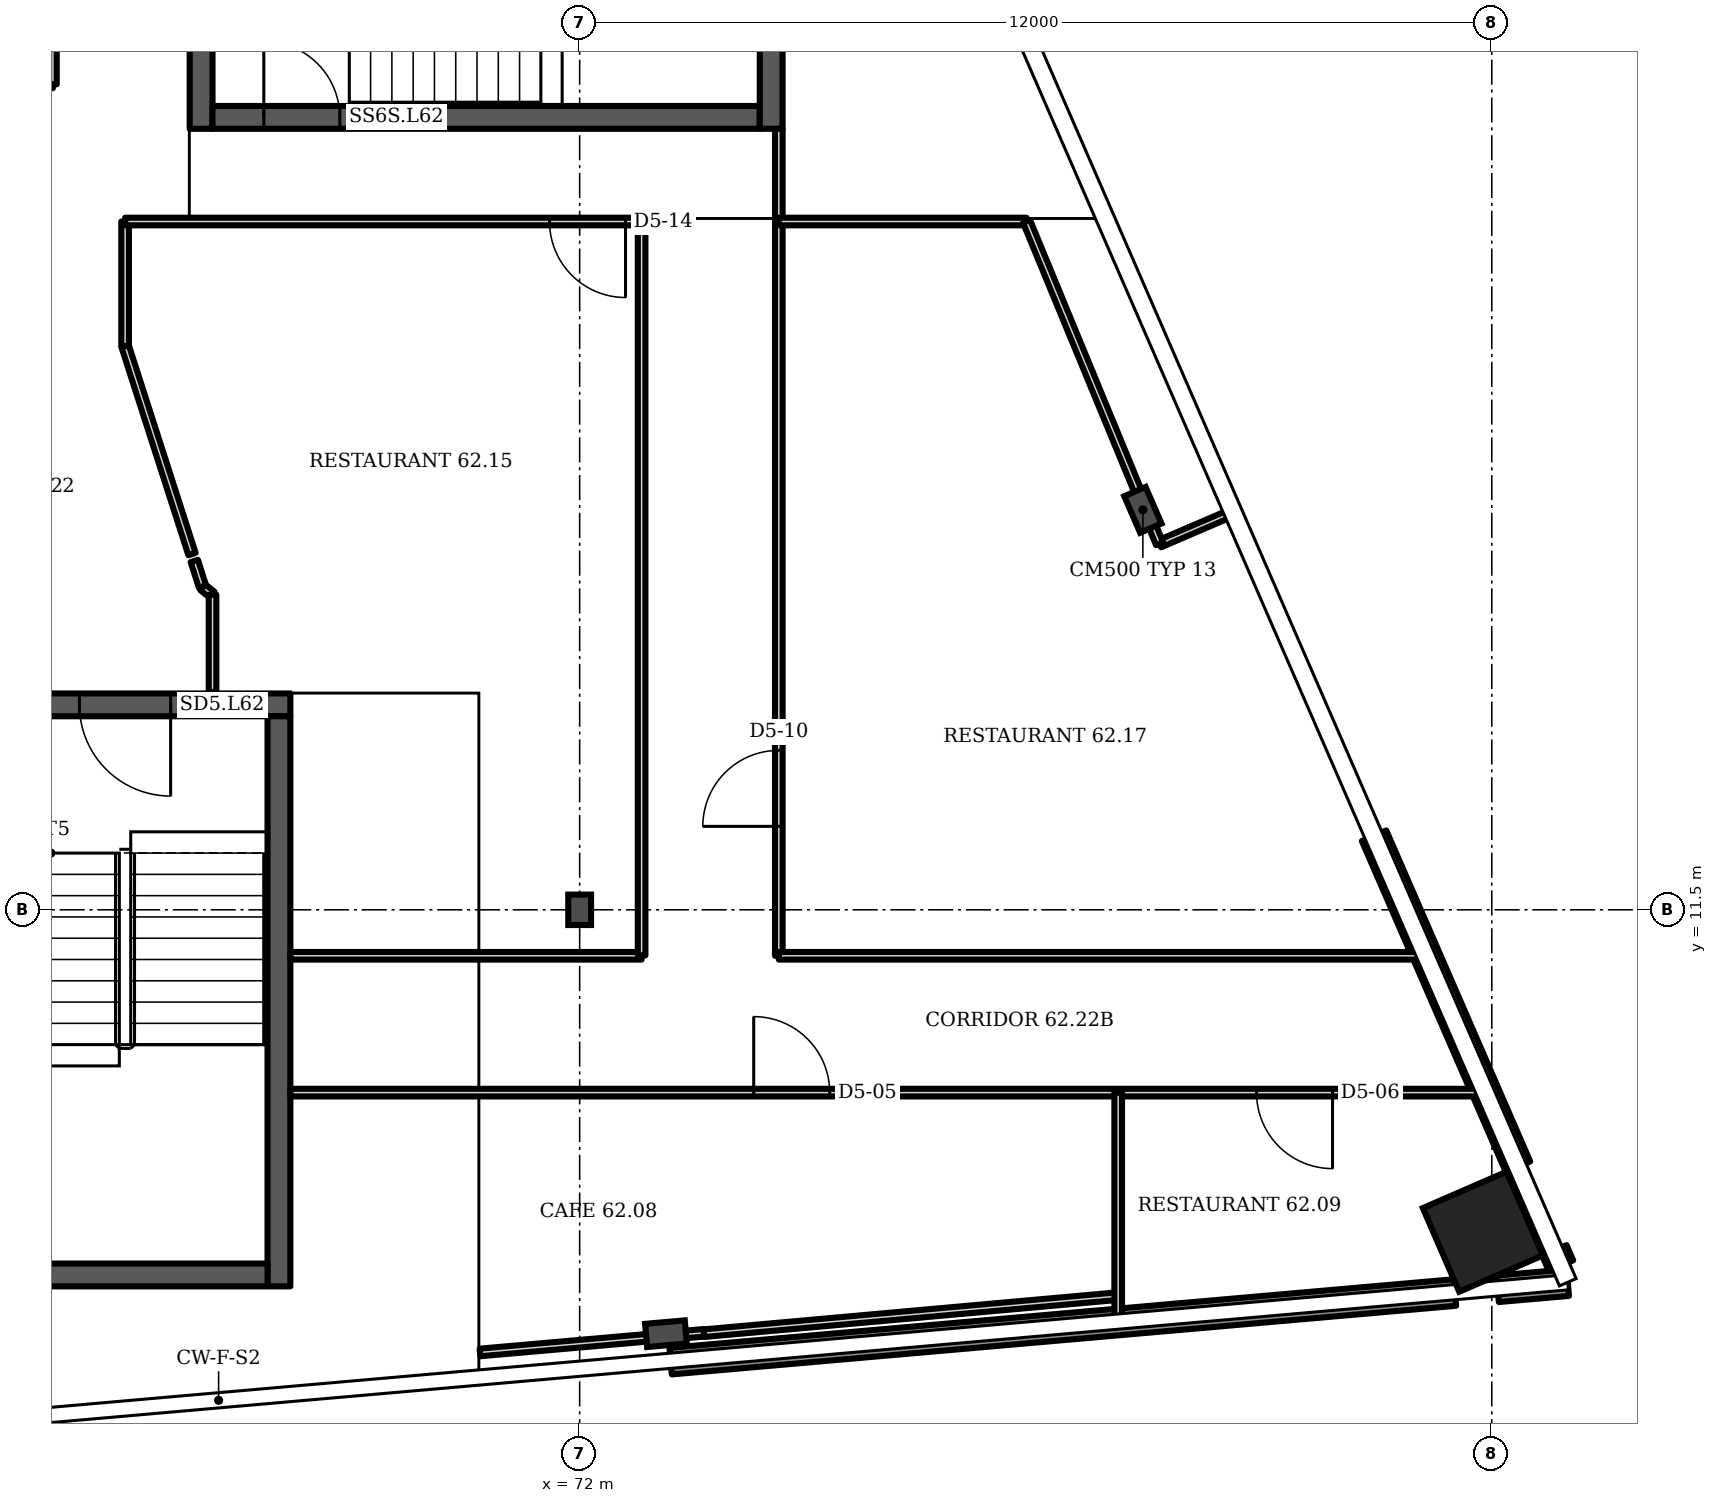
"""IFC4 building model, lengths in metres.
Left out: names, types, materials, properties, quantities, classifications, styles, units other than length and angle.
Written with IfcOpenShell. Run it as: python <this file> out.ifc"""

import sys

from ifc_helpers import new_model, si_unit, direction, frame, frame_2d, origin, origin_2d, place, context, subcontext, project, spatial, rectangle, i_section, extrude, element, fill, save


model = new_model("IFC4")
c1 = context("Model", 3, precision=1e-05, world=origin(), true_north=direction((0.0, 1.0)))
c2 = subcontext(c1, "Body", "Model", "MODEL_VIEW")
j1 = project(units=[si_unit("LENGTHUNIT", "METRE"), si_unit("PLANEANGLEUNIT", "RADIAN")], contexts=[c1])
p1 = place(None, origin())
s1 = spatial("IfcSite", under=j1, at=p1, CompositionType="ELEMENT")
p2 = place(p1, origin())
s2 = spatial("IfcBuilding", under=s1, at=p2, CompositionType="ELEMENT")
p3 = place(p2, frame((0.0, 0.0, 246.7)))
s3 = spatial("IfcBuildingStorey", under=s2, at=p3, CompositionType="ELEMENT", Elevation=246.7)
p4 = place(p3, frame((83.883, 7.265, 0.0), z_axis=(0.0, 0.0, 1.0), x_axis=(-0.398727, 0.917072, 0.0)))
e1 = element("IfcColumn", 1, at=p4, inside=s3, PredefinedType="COLUMN", context=c2, shape_type="SweptSolid", body=[
    extrude(rectangle(XDim=1.2, YDim=1.2, at=origin_2d()), origin(), (0.0, 0.0, 1.0), 3.6),
])
for number, where, z_axis, x_axis in (
    (2, (73.135, 5.923, 0.0), (0.0, 0.0, 1.0), (0.087, -0.996, 0.0)),
    (3, (79.41, 16.762, 0.0), (0.0, 0.0, 1.0), (0.917, 0.399, 0.0)),
):
    element("IfcColumn", number, at=place(p3, frame(where, z_axis=z_axis, x_axis=x_axis)), inside=s3, PredefinedType="COLUMN", context=c2, shape_type="SweptSolid", body=[
        extrude(i_section(OverallWidth=0.306, OverallDepth=0.524, WebThickness=0.021, FlangeThickness=0.04, FilletRadius=0.027, at=origin_2d()), origin(), (0.0, 0.0, 1.0), 3.6),
    ])
p5 = place(p3, frame((72.0, 11.5, 0.0), z_axis=(0.0, 0.0, 1.0), x_axis=(1.0, 0.0, 0.0)))
e4 = element("IfcColumn", 4, at=p5, inside=s3, PredefinedType="COLUMN", context=c2, shape_type="SweptSolid", body=[
    extrude(i_section(OverallWidth=0.3, OverallDepth=0.4, WebThickness=0.013, FlangeThickness=0.024, FilletRadius=0.027, at=origin_2d()), origin(), (0.0, 0.0, 1.0), 3.6),
])
p6 = place(p3, frame((73.197, 5.562, 0.0), z_axis=(0.0, 0.0, 1.0), x_axis=(0.996198, 0.087163, 0.0)))
e5 = element("IfcWall", 5, at=p6, inside=s3, PredefinedType="SOLIDWALL", context=c2, shape_type="SweptSolid", body=[
    extrude(rectangle(XDim=10.358, YDim=0.35, at=frame_2d((5.179, 0.0))), origin(), (0.0, 0.0, 1.0), 1.0),
])
p7 = place(p3, frame((84.078, 6.514, 0.0), z_axis=(0.0, 0.0, 1.0), x_axis=(0.996213, 0.086971, 0.0)))
e6 = element("IfcWall", 6, at=p7, inside=s3, PredefinedType="SOLIDWALL", context=c2, shape_type="SweptSolid", body=[
    extrude(rectangle(XDim=0.926, YDim=0.35, at=frame_2d((0.463, 0.0))), origin(), (0.0, 0.0, 1.0), 1.0),
])
p8 = place(p3, frame((84.91, 6.819, 0.0), z_axis=(0.0, 0.0, 1.0), x_axis=(-0.398359, 0.91723, 0.0)))
e7 = element("IfcWall", 7, at=p8, inside=s3, PredefinedType="SOLIDWALL", context=c2, shape_type="SweptSolid", body=[
    extrude(rectangle(XDim=0.219, YDim=0.35, at=frame_2d((0.109, 0.0))), origin(), (0.0, 0.0, 1.0), 1.0),
])
p9 = place(p3, frame((84.345, 8.12, 0.0), z_axis=(0.0, 0.0, 1.0), x_axis=(-0.398736, 0.917067, 0.0)))
e8 = element("IfcWall", 8, at=p9, inside=s3, PredefinedType="SOLIDWALL", context=c2, shape_type="SweptSolid", body=[
    extrude(rectangle(XDim=4.748, YDim=0.35, at=frame_2d((2.374, 0.0))), origin(), (0.0, 0.0, 1.0), 1.0),
])
p10 = place(p3, frame((63.844, 14.196, 0.0), z_axis=(0.0, 0.0, 1.0), x_axis=(1.0, 0.0, 0.0)))
e9 = element("IfcWall", 9, at=p10, inside=s3, PredefinedType="SHEAR", context=c2, shape_type="SweptSolid", body=[
    extrude(rectangle(XDim=4.35, YDim=0.3, at=frame_2d((2.175, 0.0))), origin(), (0.0, 0.0, 1.0), 3.2),
])
p11 = place(p10, frame((1.575, 0.0, 0.0)))
e10 = element("IfcOpeningElement", 10, at=p11, cuts=e9, PredefinedType="OPENING", context=c2, shape_type="SweptSolid", body=[
    extrude(rectangle(XDim=1.2, YDim=2.1, at=frame_2d((0.6, 1.05))), frame((0.0, 0.16, 0.0), z_axis=(0.0, -1.0, 0.0), x_axis=(1.0, 0.0, 0.0)), (0.0, 0.0, 1.0), 0.32),
])
p12 = place(p3, frame((67.02, 21.775, 0.0), z_axis=(0.0, 0.0, 1.0), x_axis=(0.0, 1.0, 0.0)))
e11 = element("IfcWall", 11, at=p12, inside=s3, PredefinedType="SHEAR", context=c2, shape_type="SweptSolid", body=[
    extrude(rectangle(XDim=4.35, YDim=0.3, at=frame_2d((2.175, 0.0))), origin(), (0.0, 0.0, 1.0), 3.2),
])
p13 = place(p12, frame((1.575, 0.0, 0.0)))
e12 = element("IfcOpeningElement", 12, at=p13, cuts=e11, PredefinedType="OPENING", context=c2, shape_type="SweptSolid", body=[
    extrude(rectangle(XDim=1.2, YDim=2.1, at=frame_2d((0.6, 1.05))), frame((0.0, 0.16, 0.0), z_axis=(0.0, -1.0, 0.0), x_axis=(1.0, 0.0, 0.0)), (0.0, 0.0, 1.0), 0.32),
])
p14 = place(p3, frame((67.17, 21.925, 0.0), z_axis=(0.0, 0.0, 1.0), x_axis=(1.0, 0.0, 0.0)))
e13 = element("IfcWall", 13, at=p14, inside=s3, PredefinedType="SHEAR", context=c2, shape_type="SweptSolid", body=[
    extrude(rectangle(XDim=7.2, YDim=0.3, at=frame_2d((3.6, 0.0))), origin(), (0.0, 0.0, 1.0), 3.2),
])
p15 = place(p14, frame((0.675, 0.0, 0.0)))
e14 = element("IfcOpeningElement", 14, at=p15, cuts=e13, PredefinedType="OPENING", context=c2, shape_type="SweptSolid", body=[
    extrude(rectangle(XDim=1.0, YDim=2.1, at=frame_2d((0.5, 1.05))), frame((0.0, 0.16, 0.0), z_axis=(0.0, -1.0, 0.0), x_axis=(1.0, 0.0, 0.0)), (0.0, 0.0, 1.0), 0.32),
])
p16 = place(p3, frame((65.07, 22.36, 0.0), z_axis=(0.0, 0.0, 1.0), x_axis=(0.0, 1.0, 0.0)))
e15 = element("IfcWall", 15, at=p16, inside=s3, PredefinedType="PARTITIONING", context=c2, shape_type="SweptSolid", body=[
    extrude(rectangle(XDim=3.495, YDim=0.1, at=frame_2d((1.748, 0.0))), origin(), (0.0, 0.0, 1.0), 3.2),
])
p17 = place(p3, frame((66.02, 18.915, 0.0), z_axis=(0.0, 0.0, 1.0), x_axis=(0.0, 1.0, 0.0)))
e16 = element("IfcWall", 16, at=p17, inside=s3, PredefinedType="PARTITIONING", context=c2, shape_type="SweptSolid", body=[
    extrude(rectangle(XDim=1.64, YDim=0.1, at=frame_2d((0.82, 0.0))), origin(), (0.0, 0.0, 1.0), 3.2),
])
p18 = place(p3, frame((66.02, 20.555, 0.0), z_axis=(0.0, 0.0, 1.0), x_axis=(1.0, 0.0, 0.0)))
e17 = element("IfcWall", 17, at=p18, inside=s3, PredefinedType="PARTITIONING", context=c2, shape_type="SweptSolid", body=[
    extrude(rectangle(XDim=6.795, YDim=0.1, at=frame_2d((3.397, 0.0))), origin(), (0.0, 0.0, 1.0), 3.2),
])
p19 = place(p18, frame((5.583, 0.0, 0.0)))
e18 = element("IfcOpeningElement", 18, at=p19, cuts=e17, PredefinedType="OPENING", context=c2, shape_type="SweptSolid", body=[
    extrude(rectangle(XDim=1.0, YDim=2.1, at=frame_2d((0.5, 1.05))), frame((0.0, 0.06, 0.0), z_axis=(0.0, -1.0, 0.0), x_axis=(1.0, 0.0, 0.0)), (0.0, 0.0, 1.0), 0.12),
])
p20 = place(p3, frame((66.9, 16.18, 0.0), z_axis=(0.0, 0.0, 1.0), x_axis=(-0.306242, 0.95195, 0.0)))
e19 = element("IfcWall", 19, at=p20, inside=s3, PredefinedType="PARTITIONING", context=c2, shape_type="SweptSolid", body=[
    extrude(rectangle(XDim=2.873, YDim=0.1, at=frame_2d((1.437, 0.0))), origin(), (0.0, 0.0, 1.0), 3.2),
])
p21 = place(p3, frame((67.04, 15.745, 0.0), z_axis=(0.0, 0.0, 1.0), x_axis=(-0.304065, 0.952647, 0.0)))
e20 = element("IfcWall", 20, at=p21, inside=s3, PredefinedType="PARTITIONING", context=c2, shape_type="SweptSolid", body=[
    extrude(rectangle(XDim=0.362, YDim=0.1, at=frame_2d((0.181, 0.0))), origin(), (0.0, 0.0, 1.0), 3.2),
])
p22 = place(p3, frame((67.165, 15.645, 0.0), z_axis=(0.0, 0.0, 1.0), x_axis=(-0.780569, 0.625065, 0.0)))
e21 = element("IfcWall", 21, at=p22, inside=s3, PredefinedType="PARTITIONING", context=c2, shape_type="SweptSolid", body=[
    extrude(rectangle(XDim=0.16, YDim=0.1, at=frame_2d((0.08, 0.0))), origin(), (0.0, 0.0, 1.0), 3.2),
])
p23 = place(p3, frame((67.17, 14.366, 0.0), z_axis=(0.0, 0.0, 1.0), x_axis=(0.0, 1.0, 0.0)))
e22 = element("IfcWall", 22, at=p23, inside=s3, PredefinedType="PARTITIONING", context=c2, shape_type="SweptSolid", body=[
    extrude(rectangle(XDim=1.279, YDim=0.1, at=frame_2d((0.639, 0.0))), origin(), (0.0, 0.0, 1.0), 3.2),
])
p24 = place(p3, frame((68.194, 9.095, 0.0), z_axis=(0.0, 0.0, 1.0), x_axis=(1.0, 0.0, 0.0)))
e23 = element("IfcWall", 23, at=p24, inside=s3, PredefinedType="PARTITIONING", context=c2, shape_type="SweptSolid", body=[
    extrude(rectangle(XDim=15.699, YDim=0.1, at=frame_2d((7.85, 0.0))), origin(), (0.0, 0.0, 1.0), 2.58),
])
p25 = place(p24, frame((6.096, 0.0, 0.0)))
e24 = element("IfcOpeningElement", 24, at=p25, cuts=e23, PredefinedType="OPENING", context=c2, shape_type="SweptSolid", body=[
    extrude(rectangle(XDim=1.0, YDim=2.1, at=frame_2d((0.5, 1.05))), frame((0.0, 0.06, 0.0), z_axis=(0.0, -1.0, 0.0), x_axis=(1.0, 0.0, 0.0)), (0.0, 0.0, 1.0), 0.12),
])
p26 = place(p24, frame((12.711, 0.0, 0.0)))
e25 = element("IfcOpeningElement", 25, at=p26, cuts=e23, PredefinedType="OPENING", context=c2, shape_type="SweptSolid", body=[
    extrude(rectangle(XDim=1.0, YDim=2.1, at=frame_2d((0.5, 1.05))), frame((0.0, 0.06, 0.0), z_axis=(0.0, -1.0, 0.0), x_axis=(1.0, 0.0, 0.0)), (0.0, 0.0, 1.0), 0.12),
])
p27 = place(p3, frame((68.194, 10.895, 0.0), z_axis=(0.0, 0.0, 1.0), x_axis=(1.0, 0.0, 0.0)))
e26 = element("IfcWall", 26, at=p27, inside=s3, PredefinedType="PARTITIONING", context=c2, shape_type="SweptSolid", body=[
    extrude(rectangle(XDim=4.621, YDim=0.1, at=frame_2d((2.311, 0.0))), origin(), (0.0, 0.0, 1.0), 3.2),
])
p28 = place(p3, frame((70.689, 5.677, 0.0), z_axis=(0.0, 0.0, 1.0), x_axis=(0.996174, 0.087417, 0.0)))
e27 = element("IfcWall", 27, at=p28, inside=s3, PredefinedType="PARTITIONING", context=c2, shape_type="SweptSolid", body=[
    extrude(rectangle(XDim=2.958, YDim=0.1, at=frame_2d((1.479, 0.0))), origin(), (0.0, 0.0, 1.0), 2.58),
])
p29 = place(p3, frame((72.815, 10.9, 0.0), z_axis=(0.0, 0.0, 1.0), x_axis=(0.0, 1.0, 0.0)))
e28 = element("IfcWall", 28, at=p29, inside=s3, PredefinedType="PARTITIONING", context=c2, shape_type="SweptSolid", body=[
    extrude(rectangle(XDim=9.725, YDim=0.1, at=frame_2d((4.863, 0.0))), origin(), (0.0, 0.0, 1.0), 3.2),
])
p30 = place(p3, frame((73.635, 5.93, 0.0), z_axis=(0.0, 0.0, 1.0), x_axis=(0.996013, 0.089228, 0.0)))
e29 = element("IfcWall", 29, at=p30, inside=s3, PredefinedType="PARTITIONING", context=c2, shape_type="SweptSolid", body=[
    extrude(rectangle(XDim=5.437, YDim=0.1, at=frame_2d((2.718, 0.0))), origin(), (0.0, 0.0, 1.0), 2.58),
])
p31 = place(p3, frame((74.62, 10.895, 0.0), z_axis=(0.0, 0.0, 1.0), x_axis=(0.0, 1.0, 0.0)))
e30 = element("IfcWall", 30, at=p31, inside=s3, PredefinedType="PARTITIONING", context=c2, shape_type="SweptSolid", body=[
    extrude(rectangle(XDim=10.88, YDim=0.1, at=frame_2d((5.44, 0.0))), origin(), (0.0, 0.0, 1.0), 3.2),
])
p32 = place(p31, frame((1.703, 0.0, 0.0)))
e31 = element("IfcOpeningElement", 31, at=p32, cuts=e30, PredefinedType="OPENING", context=c2, shape_type="SweptSolid", body=[
    extrude(rectangle(XDim=1.0, YDim=2.1, at=frame_2d((0.5, 1.05))), frame((0.0, 0.06, 0.0), z_axis=(0.0, -1.0, 0.0), x_axis=(1.0, 0.0, 0.0)), (0.0, 0.0, 1.0), 0.12),
])
p33 = place(p3, frame((74.62, 10.895, 0.0), z_axis=(0.0, 0.0, 1.0), x_axis=(1.0, 0.0, 0.0)))
e32 = element("IfcWall", 32, at=p33, inside=s3, PredefinedType="PARTITIONING", context=c2, shape_type="SweptSolid", body=[
    extrude(rectangle(XDim=8.491, YDim=0.1, at=frame_2d((4.245, 0.0))), origin(), (0.0, 0.0, 1.0), 2.58),
])
p34 = place(p3, frame((74.62, 20.555, 0.0), z_axis=(0.0, 0.0, 1.0), x_axis=(1.0, 0.0, 0.0)))
e33 = element("IfcWall", 33, at=p34, inside=s3, PredefinedType="PARTITIONING", context=c2, shape_type="SweptSolid", body=[
    extrude(rectangle(XDim=3.26, YDim=0.1, at=frame_2d((1.63, 0.0))), origin(), (0.0, 0.0, 1.0), 3.2),
])
p35 = place(p3, frame((79.085, 6.12, 0.0), z_axis=(0.0, 0.0, 1.0), x_axis=(0.0, 1.0, 0.0)))
e34 = element("IfcWall", 34, at=p35, inside=s3, PredefinedType="PARTITIONING", context=c2, shape_type="SweptSolid", body=[
    extrude(rectangle(XDim=2.975, YDim=0.1, at=frame_2d((1.487, 0.0))), origin(), (0.0, 0.0, 1.0), 2.58),
])
p36 = place(p3, frame((79.63, 16.315, 0.0), z_axis=(0.0, 0.0, 1.0), x_axis=(0.918616, 0.395147, 0.0)))
e35 = element("IfcWall", 35, at=p36, inside=s3, PredefinedType="PARTITIONING", context=c2, shape_type="SweptSolid", body=[
    extrude(rectangle(XDim=1.031, YDim=0.1, at=frame_2d((0.516, 0.0))), origin(), (0.0, 0.0, 1.0), 2.58),
])
p37 = place(p3, frame((79.63, 16.315, 0.0), z_axis=(0.0, 0.0, 1.0), x_axis=(-0.381517, 0.924359, 0.0)))
e36 = element("IfcWall", 36, at=p37, inside=s3, PredefinedType="PARTITIONING", context=c2, shape_type="SweptSolid", body=[
    extrude(rectangle(XDim=4.587, YDim=0.1, at=frame_2d((2.293, 0.0))), origin(), (0.0, 0.0, 1.0), 3.2),
])
p38 = place(p3, frame((68.044, 6.546, 0.0), z_axis=(0.0, 0.0, 1.0), x_axis=(0.0, 1.0, 0.0)))
e37 = element("IfcWall", 37, at=p38, inside=s3, PredefinedType="SHEAR", context=c2, shape_type="SweptSolid", body=[
    extrude(rectangle(XDim=7.5, YDim=0.3, at=frame_2d((3.75, 0.0))), origin(), (0.0, 0.0, 1.0), 3.2),
])
p39 = place(p3, frame((64.144, 6.696, 0.0), z_axis=(0.0, 0.0, 1.0), x_axis=(1.0, 0.0, 0.0)))
e38 = element("IfcWall", 38, at=p39, inside=s3, PredefinedType="SHEAR", context=c2, shape_type="SweptSolid", body=[
    extrude(rectangle(XDim=3.75, YDim=0.3, at=frame_2d((1.875, 0.0))), origin(), (0.0, 0.0, 1.0), 3.2),
])
p40 = place(p3, frame((74.52, 21.775, 0.0), z_axis=(0.0, 0.0, 1.0), x_axis=(0.0, 1.0, 0.0)))
e39 = element("IfcWall", 39, at=p40, inside=s3, PredefinedType="SHEAR", context=c2, shape_type="SweptSolid", body=[
    extrude(rectangle(XDim=4.05, YDim=0.3, at=frame_2d((2.025, 0.0))), origin(), (0.0, 0.0, 1.0), 3.2),
])
p41 = place(p11, origin())
e40 = element("IfcDoor", 40, at=p41, inside=s3, OperationType="SINGLE_SWING_RIGHT", PredefinedType="DOOR", context=c2, shape_type="SweptSolid", body=[
    extrude(rectangle(XDim=1.2, YDim=2.1, at=frame_2d((0.6, 1.05))), frame((0.0, 0.025, 0.0), z_axis=(0.0, -1.0, 0.0), x_axis=(1.0, 0.0, 0.0)), (0.0, 0.0, 1.0), 0.05),
])
fill(e10, e40)
p42 = place(p15, origin())
e41 = element("IfcDoor", 41, at=p42, inside=s3, OperationType="SINGLE_SWING_LEFT", PredefinedType="DOOR", context=c2, shape_type="SweptSolid", body=[
    extrude(rectangle(XDim=1.0, YDim=2.1, at=frame_2d((0.5, 1.05))), frame((0.0, 0.025, 0.0), z_axis=(0.0, -1.0, 0.0), x_axis=(1.0, 0.0, 0.0)), (0.0, 0.0, 1.0), 0.05),
])
fill(e14, e41)
p43 = place(p25, origin())
e42 = element("IfcDoor", 42, at=p43, inside=s3, OperationType="SINGLE_SWING_LEFT", PredefinedType="DOOR", context=c2, shape_type="SweptSolid", body=[
    extrude(rectangle(XDim=1.0, YDim=2.1, at=frame_2d((0.5, 1.05))), frame((0.0, 0.025, 0.0), z_axis=(0.0, -1.0, 0.0), x_axis=(1.0, 0.0, 0.0)), (0.0, 0.0, 1.0), 0.05),
])
fill(e24, e42)
p44 = place(p26, origin())
e43 = element("IfcDoor", 43, at=p44, inside=s3, OperationType="SINGLE_SWING_RIGHT", PredefinedType="DOOR", context=c2, shape_type="SweptSolid", body=[
    extrude(rectangle(XDim=1.0, YDim=2.1, at=frame_2d((0.5, 1.05))), frame((0.0, 0.025, 0.0), z_axis=(0.0, -1.0, 0.0), x_axis=(1.0, 0.0, 0.0)), (0.0, 0.0, 1.0), 0.05),
])
fill(e25, e43)
p45 = place(p32, origin())
e44 = element("IfcDoor", 44, at=p45, inside=s3, OperationType="SINGLE_SWING_LEFT", PredefinedType="DOOR", context=c2, shape_type="SweptSolid", body=[
    extrude(rectangle(XDim=1.0, YDim=2.1, at=frame_2d((0.5, 1.05))), frame((0.0, 0.025, 0.0), z_axis=(0.0, -1.0, 0.0), x_axis=(1.0, 0.0, 0.0)), (0.0, 0.0, 1.0), 0.05),
])
fill(e31, e44)
p46 = place(p19, origin())
e45 = element("IfcDoor", 45, at=p46, inside=s3, OperationType="SINGLE_SWING_RIGHT", PredefinedType="DOOR", context=c2, shape_type="SweptSolid", body=[
    extrude(rectangle(XDim=1.0, YDim=2.1, at=frame_2d((0.5, 1.05))), frame((0.0, 0.025, 0.0), z_axis=(0.0, -1.0, 0.0), x_axis=(1.0, 0.0, 0.0)), (0.0, 0.0, 1.0), 0.05),
])
fill(e18, e45)
save(model, sys.argv[1])
